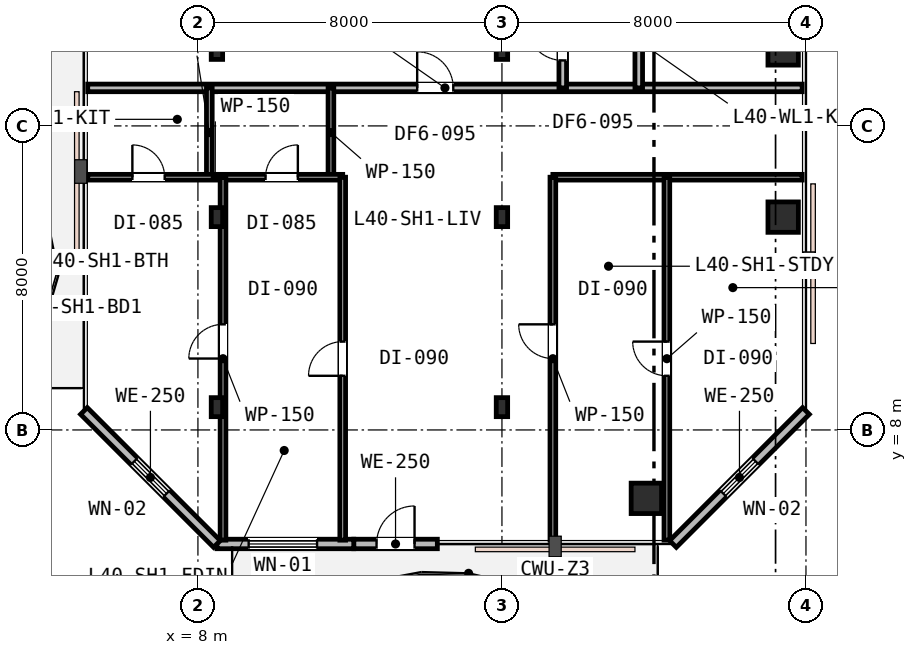
"""IFC4 building model, lengths in metres.
Left out: names, types, materials, properties, quantities, classifications, styles, units other than length and angle.
Written with IfcOpenShell. Run it as: python <this file> out.ifc"""

import sys

from ifc_helpers import new_model, si_unit, direction, frame, frame_2d, origin, origin_2d, place, context, subcontext, project, spatial, rectangle, i_section, extrude, element, fill, save


model = new_model("IFC4")
c1 = context("Model", 3, precision=1e-05, world=origin(), true_north=direction((0.0, 1.0)))
c2 = subcontext(c1, "Body", "Model", "MODEL_VIEW")
j1 = project(units=[si_unit("LENGTHUNIT", "METRE"), si_unit("PLANEANGLEUNIT", "RADIAN")], contexts=[c1])
p1 = place(None, origin())
s1 = spatial("IfcSite", under=j1, at=p1, CompositionType="ELEMENT")
p2 = place(p1, origin())
s2 = spatial("IfcBuilding", under=s1, at=p2, CompositionType="ELEMENT")
p3 = place(p2, frame((0.0, 0.0, 157.8)))
s3 = spatial("IfcBuildingStorey", under=s2, at=p3, CompositionType="ELEMENT", Elevation=157.8)
for number, where, z_axis, x_axis in (
    (1, (19.8, 6.2, 0.0), (0.0, 0.0, 1.0), (1.0, 0.0, 0.0)),
    (2, (23.4, 13.6, 0.0), (0.0, 0.0, 1.0), (1.0, 0.0, 0.0)),
    (3, (23.4, 18.0, 0.0), (0.0, 0.0, 1.0), (1.0, 0.0, 0.0)),
):
    element("IfcColumn", number, at=place(p3, frame(where, z_axis=z_axis, x_axis=x_axis)), inside=s3, PredefinedType="COLUMN", context=c2, shape_type="SweptSolid", body=[
        extrude(rectangle(XDim=0.8, YDim=0.8, at=origin_2d()), origin(), (0.0, 0.0, 1.0), 3.6),
    ])
for number, where, z_axis, x_axis in (
    (4, (8.5, 8.6, 0.0), (0.0, 0.0, 1.0), (1.0, 0.0, 0.0)),
    (5, (16.0, 8.6, 0.0), (0.0, 0.0, 1.0), (1.0, 0.0, 0.0)),
    (6, (8.5, 13.6, 0.0), (0.0, 0.0, 1.0), (1.0, 0.0, 0.0)),
    (7, (16.0, 13.6, 0.0), (0.0, 0.0, 1.0), (1.0, 0.0, 0.0)),
    (8, (8.5, 18.0, 0.0), (0.0, 0.0, 1.0), (1.0, 0.0, 0.0)),
    (9, (16.0, 18.0, 0.0), (0.0, 0.0, 1.0), (1.0, 0.0, 0.0)),
):
    element("IfcColumn", number, at=place(p3, frame(where, z_axis=z_axis, x_axis=x_axis)), inside=s3, PredefinedType="COLUMN", context=c2, shape_type="SweptSolid", body=[
        extrude(i_section(OverallWidth=0.3, OverallDepth=0.5, WebThickness=0.015, FlangeThickness=0.028, FilletRadius=0.027, at=origin_2d()), origin(), (0.0, 0.0, 1.0), 3.6),
    ])
p4 = place(p3, frame((12.1, 5.0, 0.0), z_axis=(0.0, 0.0, 1.0), x_axis=(1.0, 0.0, 0.0)))
e10 = element("IfcWall", 10, at=p4, inside=s3, PredefinedType="STANDARD", context=c2, shape_type="SweptSolid", body=[
    extrude(rectangle(XDim=2.2, YDim=0.25, at=frame_2d((1.1, 0.0))), origin(), (0.0, 0.0, 1.0), 3.33),
])
p5 = place(p4, frame((0.6, 0.0, 0.0)))
e11 = element("IfcOpeningElement", 11, at=p5, cuts=e10, PredefinedType="OPENING", context=c2, shape_type="SweptSolid", body=[
    extrude(rectangle(XDim=1.0, YDim=2.15, at=frame_2d((0.5, 1.075))), frame((0.0, 0.135, 0.0), z_axis=(0.0, -1.0, 0.0), x_axis=(1.0, 0.0, 0.0)), (0.0, 0.0, 1.0), 0.27),
])
p6 = place(p3, frame((8.5, 5.0, 0.0), z_axis=(0.0, 0.0, 1.0), x_axis=(1.0, 0.0, 0.0)))
e12 = element("IfcWall", 12, at=p6, inside=s3, PredefinedType="STANDARD", context=c2, shape_type="SweptSolid", body=[
    extrude(rectangle(XDim=3.6, YDim=0.25, at=frame_2d((1.8, 0.0))), origin(), (0.0, 0.0, 1.0), 3.33),
])
p7 = place(p6, frame((0.835, 0.0, 0.75)))
e13 = element("IfcOpeningElement", 13, at=p7, cuts=e12, PredefinedType="OPENING", context=c2, shape_type="SweptSolid", body=[
    extrude(rectangle(XDim=1.8, YDim=1.85, at=frame_2d((0.9, 0.925))), frame((0.0, 0.135, 0.0), z_axis=(0.0, -1.0, 0.0), x_axis=(1.0, 0.0, 0.0)), (0.0, 0.0, 1.0), 0.27),
])
p8 = place(p3, frame((20.5, 5.0, 0.0), z_axis=(0.0, 0.0, 1.0), x_axis=(0.707106781187, 0.707106781187, 0.0)))
e14 = element("IfcWall", 14, at=p8, inside=s3, PredefinedType="STANDARD", context=c2, shape_type="SweptSolid", body=[
    extrude(rectangle(XDim=4.95, YDim=0.25, at=frame_2d((2.475, 0.0))), origin(), (0.0, 0.0, 1.0), 3.33),
])
p9 = place(p8, frame((1.875, 0.0, 0.85)))
e15 = element("IfcOpeningElement", 15, at=p9, cuts=e14, PredefinedType="OPENING", context=c2, shape_type="SweptSolid", body=[
    extrude(rectangle(XDim=1.2, YDim=1.6, at=frame_2d((0.6, 0.8))), frame((0.0, 0.135, 0.0), z_axis=(0.0, -1.0, 0.0), x_axis=(1.0, 0.0, 0.0)), (0.0, 0.0, 1.0), 0.27),
])
p10 = place(p3, frame((5.0, 8.5, 0.0), z_axis=(0.0, 0.0, 1.0), x_axis=(0.707106781187, -0.707106781187, 0.0)))
e16 = element("IfcWall", 16, at=p10, inside=s3, PredefinedType="STANDARD", context=c2, shape_type="SweptSolid", body=[
    extrude(rectangle(XDim=4.95, YDim=0.25, at=frame_2d((2.475, 0.0))), origin(), (0.0, 0.0, 1.0), 3.33),
])
p11 = place(p10, frame((1.875, 0.0, 0.85)))
e17 = element("IfcOpeningElement", 17, at=p11, cuts=e16, PredefinedType="OPENING", context=c2, shape_type="SweptSolid", body=[
    extrude(rectangle(XDim=1.2, YDim=1.6, at=frame_2d((0.6, 0.8))), frame((0.0, 0.135, 0.0), z_axis=(0.0, -1.0, 0.0), x_axis=(1.0, 0.0, 0.0)), (0.0, 0.0, 1.0), 0.27),
])
p12 = place(p3, frame((5.1, 17.0, 0.0), z_axis=(0.0, 0.0, 1.0), x_axis=(1.0, 0.0, 0.0)))
e18 = element("IfcWall", 18, at=p12, inside=s3, PredefinedType="PARTITIONING", context=c2, shape_type="SweptSolid", body=[
    extrude(rectangle(XDim=18.8, YDim=0.2, at=frame_2d((9.4, 0.0))), origin(), (0.0, 0.0, 1.0), 2.93),
])
p13 = place(p12, frame((8.669, 0.0, 0.0)))
e19 = element("IfcOpeningElement", 19, at=p13, cuts=e18, PredefinedType="OPENING", context=c2, shape_type="SweptSolid", body=[
    extrude(rectangle(XDim=0.95, YDim=2.15, at=frame_2d((0.475, 1.075))), frame((0.0, 0.11, 0.0), z_axis=(0.0, -1.0, 0.0), x_axis=(1.0, 0.0, 0.0)), (0.0, 0.0, 1.0), 0.22),
])
p14 = place(p3, frame((17.6, 17.0, 0.0), z_axis=(0.0, 0.0, 1.0), x_axis=(0.0, 1.0, 0.0)))
e20 = element("IfcWall", 20, at=p14, inside=s3, PredefinedType="PARTITIONING", context=c2, shape_type="SweptSolid", body=[
    extrude(rectangle(XDim=11.6, YDim=0.2, at=frame_2d((5.8, 0.0))), origin(), (0.0, 0.0, 1.0), 2.93),
])
p15 = place(p14, frame((0.723, 0.0, 0.0)))
e21 = element("IfcOpeningElement", 21, at=p15, cuts=e20, PredefinedType="OPENING", context=c2, shape_type="SweptSolid", body=[
    extrude(rectangle(XDim=0.95, YDim=2.15, at=frame_2d((0.475, 1.075))), frame((0.0, 0.11, 0.0), z_axis=(0.0, -1.0, 0.0), x_axis=(1.0, 0.0, 0.0)), (0.0, 0.0, 1.0), 0.22),
])
p16 = place(p3, frame((19.6, 17.0, 0.0), z_axis=(0.0, 0.0, 1.0), x_axis=(0.0, 1.0, 0.0)))
e22 = element("IfcWall", 22, at=p16, inside=s3, PredefinedType="PARTITIONING", context=c2, shape_type="SweptSolid", body=[
    extrude(rectangle(XDim=11.6, YDim=0.2, at=frame_2d((5.8, 0.0))), origin(), (0.0, 0.0, 1.0), 2.93),
])
p17 = place(p16, frame((3.125, 0.0, 0.0)))
e23 = element("IfcOpeningElement", 23, at=p17, cuts=e22, PredefinedType="OPENING", context=c2, shape_type="SweptSolid", body=[
    extrude(rectangle(XDim=0.95, YDim=2.15, at=frame_2d((0.475, 1.075))), frame((0.0, 0.11, 0.0), z_axis=(0.0, -1.0, 0.0), x_axis=(1.0, 0.0, 0.0)), (0.0, 0.0, 1.0), 0.22),
])
p18 = place(p3, frame((11.5, 14.65, 0.0), z_axis=(0.0, 0.0, 1.0), x_axis=(0.0, 1.0, 0.0)))
e24 = element("IfcWall", 24, at=p18, inside=s3, PredefinedType="PARTITIONING", context=c2, shape_type="SweptSolid", body=[
    extrude(rectangle(XDim=2.35, YDim=0.15, at=frame_2d((1.175, 0.0))), origin(), (0.0, 0.0, 1.0), 2.96),
])
p19 = place(p3, frame((8.3, 14.65, 0.0), z_axis=(0.0, 0.0, 1.0), x_axis=(0.0, 1.0, 0.0)))
e25 = element("IfcWall", 25, at=p19, inside=s3, PredefinedType="PARTITIONING", context=c2, shape_type="SweptSolid", body=[
    extrude(rectangle(XDim=2.35, YDim=0.15, at=frame_2d((1.175, 0.0))), origin(), (0.0, 0.0, 1.0), 2.93),
])
p20 = place(p3, frame((5.1, 14.65, 0.0), z_axis=(0.0, 0.0, 1.0), x_axis=(1.0, 0.0, 0.0)))
e26 = element("IfcWall", 26, at=p20, inside=s3, PredefinedType="PARTITIONING", context=c2, shape_type="SweptSolid", body=[
    extrude(rectangle(XDim=6.71, YDim=0.15, at=frame_2d((3.355, 0.0))), origin(), (0.0, 0.0, 1.0), 2.93),
])
p21 = place(p20, frame((1.175, 0.0, 0.0)))
e27 = element("IfcOpeningElement", 27, at=p21, cuts=e26, PredefinedType="OPENING", context=c2, shape_type="SweptSolid", body=[
    extrude(rectangle(XDim=0.85, YDim=2.15, at=frame_2d((0.425, 1.075))), frame((0.0, 0.085, 0.0), z_axis=(0.0, -1.0, 0.0), x_axis=(1.0, 0.0, 0.0)), (0.0, 0.0, 1.0), 0.17),
])
p22 = place(p20, frame((4.679, 0.0, 0.0)))
e28 = element("IfcOpeningElement", 28, at=p22, cuts=e26, PredefinedType="OPENING", context=c2, shape_type="SweptSolid", body=[
    extrude(rectangle(XDim=0.85, YDim=2.15, at=frame_2d((0.425, 1.075))), frame((0.0, 0.085, 0.0), z_axis=(0.0, -1.0, 0.0), x_axis=(1.0, 0.0, 0.0)), (0.0, 0.0, 1.0), 0.17),
])
p23 = place(p3, frame((17.34, 14.65, 0.0), z_axis=(0.0, 0.0, 1.0), x_axis=(1.0, 0.0, 0.0)))
e29 = element("IfcWall", 29, at=p23, inside=s3, PredefinedType="PARTITIONING", context=c2, shape_type="SweptSolid", body=[
    extrude(rectangle(XDim=6.56, YDim=0.15, at=frame_2d((3.28, 0.0))), origin(), (0.0, 0.0, 1.0), 2.96),
])
p24 = place(p3, frame((8.66, 5.1, 0.0), z_axis=(0.0, 0.0, 1.0), x_axis=(0.0, 1.0, 0.0)))
e30 = element("IfcWall", 30, at=p24, inside=s3, PredefinedType="PARTITIONING", context=c2, shape_type="SweptSolid", body=[
    extrude(rectangle(XDim=9.55, YDim=0.15, at=frame_2d((4.775, 0.0))), origin(), (0.0, 0.0, 1.0), 2.93),
])
p25 = place(p24, frame((4.779, 0.0, 0.0)))
e31 = element("IfcOpeningElement", 31, at=p25, cuts=e30, PredefinedType="OPENING", context=c2, shape_type="SweptSolid", body=[
    extrude(rectangle(XDim=0.9, YDim=2.15, at=frame_2d((0.45, 1.075))), frame((0.0, 0.085, 0.0), z_axis=(0.0, -1.0, 0.0), x_axis=(1.0, 0.0, 0.0)), (0.0, 0.0, 1.0), 0.17),
])
p26 = place(p3, frame((20.34, 5.1, 0.0), z_axis=(0.0, 0.0, 1.0), x_axis=(0.0, 1.0, 0.0)))
e32 = element("IfcWall", 32, at=p26, inside=s3, PredefinedType="PARTITIONING", context=c2, shape_type="SweptSolid", body=[
    extrude(rectangle(XDim=9.55, YDim=0.15, at=frame_2d((4.775, 0.0))), origin(), (0.0, 0.0, 1.0), 2.93),
])
p27 = place(p26, frame((4.325, 0.0, 0.0)))
e33 = element("IfcOpeningElement", 33, at=p27, cuts=e32, PredefinedType="OPENING", context=c2, shape_type="SweptSolid", body=[
    extrude(rectangle(XDim=0.9, YDim=2.15, at=frame_2d((0.45, 1.075))), frame((0.0, 0.085, 0.0), z_axis=(0.0, -1.0, 0.0), x_axis=(1.0, 0.0, 0.0)), (0.0, 0.0, 1.0), 0.17),
])
p28 = place(p3, frame((17.34, 5.1, 0.0), z_axis=(0.0, 0.0, 1.0), x_axis=(0.0, 1.0, 0.0)))
e34 = element("IfcWall", 34, at=p28, inside=s3, PredefinedType="PARTITIONING", context=c2, shape_type="SweptSolid", body=[
    extrude(rectangle(XDim=9.55, YDim=0.15, at=frame_2d((4.775, 0.0))), origin(), (0.0, 0.0, 1.0), 2.93),
])
p29 = place(p28, frame((4.779, 0.0, 0.0)))
e35 = element("IfcOpeningElement", 35, at=p29, cuts=e34, PredefinedType="OPENING", context=c2, shape_type="SweptSolid", body=[
    extrude(rectangle(XDim=0.9, YDim=2.15, at=frame_2d((0.45, 1.075))), frame((0.0, 0.085, 0.0), z_axis=(0.0, -1.0, 0.0), x_axis=(1.0, 0.0, 0.0)), (0.0, 0.0, 1.0), 0.17),
])
p30 = place(p3, frame((11.81, 5.1, 0.0), z_axis=(0.0, 0.0, 1.0), x_axis=(0.0, 1.0, 0.0)))
e36 = element("IfcWall", 36, at=p30, inside=s3, PredefinedType="PARTITIONING", context=c2, shape_type="SweptSolid", body=[
    extrude(rectangle(XDim=9.55, YDim=0.15, at=frame_2d((4.775, 0.0))), origin(), (0.0, 0.0, 1.0), 2.93),
])
p31 = place(p30, frame((4.325, 0.0, 0.0)))
e37 = element("IfcOpeningElement", 37, at=p31, cuts=e36, PredefinedType="OPENING", context=c2, shape_type="SweptSolid", body=[
    extrude(rectangle(XDim=0.9, YDim=2.15, at=frame_2d((0.45, 1.075))), frame((0.0, 0.085, 0.0), z_axis=(0.0, -1.0, 0.0), x_axis=(1.0, 0.0, 0.0)), (0.0, 0.0, 1.0), 0.17),
])
p32 = place(p5, origin())
e38 = element("IfcDoor", 38, at=p32, inside=s3, OperationType="SINGLE_SWING_RIGHT", PredefinedType="DOOR", context=c2, shape_type="SweptSolid", body=[
    extrude(rectangle(XDim=1.0, YDim=2.15, at=frame_2d((0.5, 1.075))), frame((0.0, 0.025, 0.0), z_axis=(0.0, -1.0, 0.0), x_axis=(1.0, 0.0, 0.0)), (0.0, 0.0, 1.0), 0.05),
])
fill(e11, e38)
p33 = place(p7, origin())
e39 = element("IfcWindow", 39, at=p33, inside=s3, PartitioningType="SINGLE_PANEL", PredefinedType="WINDOW", context=c2, shape_type="SweptSolid", body=[
    extrude(rectangle(XDim=1.8, YDim=1.85, at=frame_2d((0.9, 0.925))), frame((0.0, 0.03, 0.0), z_axis=(0.0, -1.0, 0.0), x_axis=(1.0, 0.0, 0.0)), (0.0, 0.0, 1.0), 0.06),
])
fill(e13, e39)
p34 = place(p9, origin())
e40 = element("IfcWindow", 40, at=p34, inside=s3, PartitioningType="SINGLE_PANEL", PredefinedType="WINDOW", context=c2, shape_type="SweptSolid", body=[
    extrude(rectangle(XDim=1.2, YDim=1.6, at=frame_2d((0.6, 0.8))), frame((0.0, 0.03, 0.0), z_axis=(0.0, -1.0, 0.0), x_axis=(1.0, 0.0, 0.0)), (0.0, 0.0, 1.0), 0.06),
])
fill(e15, e40)
p35 = place(p11, origin())
e41 = element("IfcWindow", 41, at=p35, inside=s3, PartitioningType="SINGLE_PANEL", PredefinedType="WINDOW", context=c2, shape_type="SweptSolid", body=[
    extrude(rectangle(XDim=1.2, YDim=1.6, at=frame_2d((0.6, 0.8))), frame((0.0, 0.03, 0.0), z_axis=(0.0, -1.0, 0.0), x_axis=(1.0, 0.0, 0.0)), (0.0, 0.0, 1.0), 0.06),
])
fill(e17, e41)
p36 = place(p15, origin())
e42 = element("IfcDoor", 42, at=p36, inside=s3, OperationType="SINGLE_SWING_RIGHT", PredefinedType="DOOR", context=c2, shape_type="SweptSolid", body=[
    extrude(rectangle(XDim=0.95, YDim=2.15, at=frame_2d((0.475, 1.075))), frame((0.0, 0.025, 0.0), z_axis=(0.0, -1.0, 0.0), x_axis=(1.0, 0.0, 0.0)), (0.0, 0.0, 1.0), 0.05),
])
fill(e21, e42)
p37 = place(p13, origin())
e43 = element("IfcDoor", 43, at=p37, inside=s3, OperationType="SINGLE_SWING_LEFT", PredefinedType="DOOR", context=c2, shape_type="SweptSolid", body=[
    extrude(rectangle(XDim=0.95, YDim=2.15, at=frame_2d((0.475, 1.075))), frame((0.0, 0.025, 0.0), z_axis=(0.0, -1.0, 0.0), x_axis=(1.0, 0.0, 0.0)), (0.0, 0.0, 1.0), 0.05),
])
fill(e19, e43)
p38 = place(p21, origin())
e44 = element("IfcDoor", 44, at=p38, inside=s3, OperationType="SINGLE_SWING_LEFT", PredefinedType="DOOR", context=c2, shape_type="SweptSolid", body=[
    extrude(rectangle(XDim=0.85, YDim=2.15, at=frame_2d((0.425, 1.075))), frame((0.0, 0.025, 0.0), z_axis=(0.0, -1.0, 0.0), x_axis=(1.0, 0.0, 0.0)), (0.0, 0.0, 1.0), 0.05),
])
fill(e27, e44)
p39 = place(p22, origin())
e45 = element("IfcDoor", 45, at=p39, inside=s3, OperationType="SINGLE_SWING_RIGHT", PredefinedType="DOOR", context=c2, shape_type="SweptSolid", body=[
    extrude(rectangle(XDim=0.85, YDim=2.15, at=frame_2d((0.425, 1.075))), frame((0.0, 0.025, 0.0), z_axis=(0.0, -1.0, 0.0), x_axis=(1.0, 0.0, 0.0)), (0.0, 0.0, 1.0), 0.05),
])
fill(e28, e45)
p40 = place(p25, origin())
e46 = element("IfcDoor", 46, at=p40, inside=s3, OperationType="SINGLE_SWING_LEFT", PredefinedType="DOOR", context=c2, shape_type="SweptSolid", body=[
    extrude(rectangle(XDim=0.9, YDim=2.15, at=frame_2d((0.45, 1.075))), frame((0.0, 0.025, 0.0), z_axis=(0.0, -1.0, 0.0), x_axis=(1.0, 0.0, 0.0)), (0.0, 0.0, 1.0), 0.05),
])
fill(e31, e46)
p41 = place(p27, origin())
e47 = element("IfcDoor", 47, at=p41, inside=s3, OperationType="SINGLE_SWING_RIGHT", PredefinedType="DOOR", context=c2, shape_type="SweptSolid", body=[
    extrude(rectangle(XDim=0.9, YDim=2.15, at=frame_2d((0.45, 1.075))), frame((0.0, 0.025, 0.0), z_axis=(0.0, -1.0, 0.0), x_axis=(1.0, 0.0, 0.0)), (0.0, 0.0, 1.0), 0.05),
])
fill(e33, e47)
p42 = place(p29, origin())
e48 = element("IfcDoor", 48, at=p42, inside=s3, OperationType="SINGLE_SWING_RIGHT", PredefinedType="DOOR", context=c2, shape_type="SweptSolid", body=[
    extrude(rectangle(XDim=0.9, YDim=2.15, at=frame_2d((0.45, 1.075))), frame((0.0, 0.025, 0.0), z_axis=(0.0, -1.0, 0.0), x_axis=(1.0, 0.0, 0.0)), (0.0, 0.0, 1.0), 0.05),
])
fill(e35, e48)
p43 = place(p31, origin())
e49 = element("IfcDoor", 49, at=p43, inside=s3, OperationType="SINGLE_SWING_LEFT", PredefinedType="DOOR", context=c2, shape_type="SweptSolid", body=[
    extrude(rectangle(XDim=0.9, YDim=2.15, at=frame_2d((0.45, 1.075))), frame((0.0, 0.025, 0.0), z_axis=(0.0, -1.0, 0.0), x_axis=(1.0, 0.0, 0.0)), (0.0, 0.0, 1.0), 0.05),
])
fill(e37, e49)
save(model, sys.argv[1])
